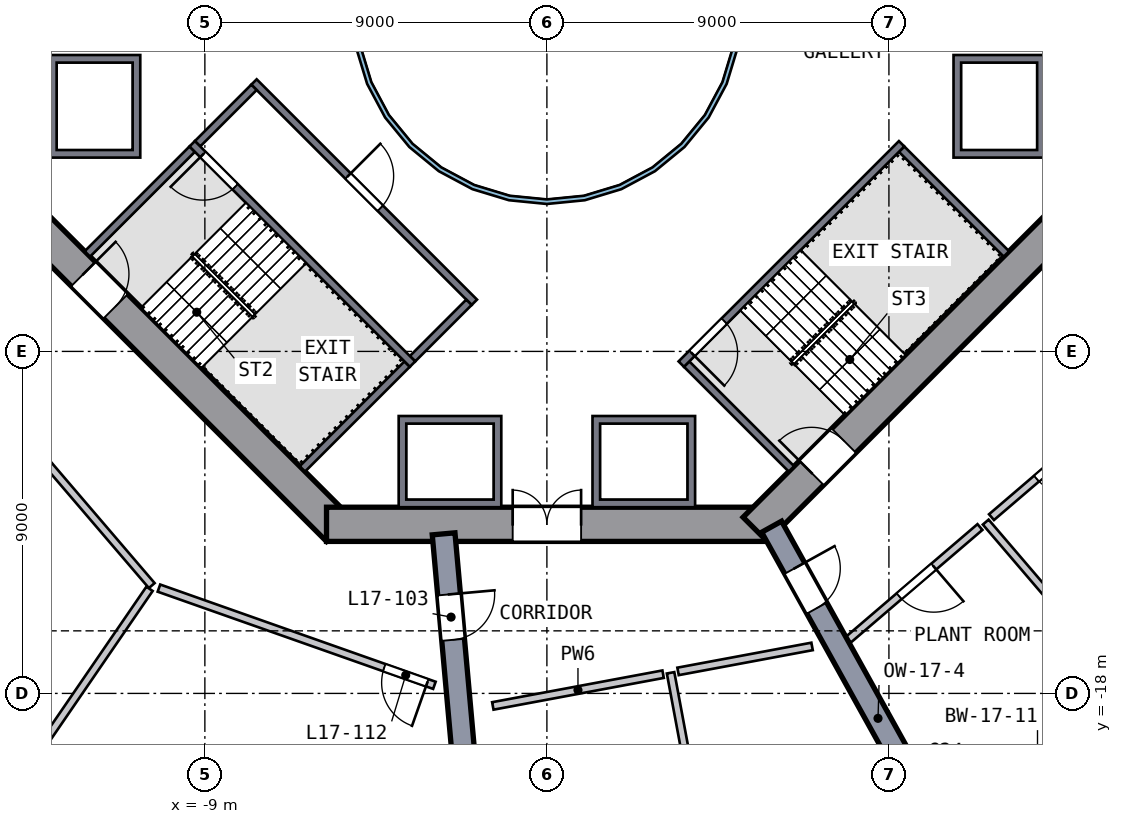
"""IFC4 building model, lengths in metres.
Left out: names, types, materials, properties, quantities, classifications, styles, units other than length and angle.
Written with IfcOpenShell. Run it as: python <this file> out.ifc"""

import sys

from ifc_helpers import new_model, si_unit, direction, frame, frame_2d, origin, place, context, subcontext, project, spatial, polyline, rectangle, outline, extrude, element, fill, save


model = new_model("IFC4")
c1 = context("Model", 3, precision=1e-05, world=origin(), true_north=direction((0.0, 1.0)))
c2 = subcontext(c1, "Body", "Model", "MODEL_VIEW")
j1 = project(units=[si_unit("LENGTHUNIT", "METRE"), si_unit("PLANEANGLEUNIT", "RADIAN")], contexts=[c1])
p1 = place(None, origin())
s1 = spatial("IfcSite", under=j1, at=p1, CompositionType="ELEMENT")
p2 = place(p1, origin())
s2 = spatial("IfcBuilding", under=s1, at=p2, CompositionType="ELEMENT")
p3 = place(p2, frame((0.0, 0.0, 75.0)))
s3 = spatial("IfcBuildingStorey", under=s2, at=p3, CompositionType="ELEMENT", Elevation=75.0)
p4 = place(p3, frame((-13.682, -5.481, 0.0), z_axis=(0.0, 0.0, 1.0), x_axis=(0.707106781, -0.707106781, 0.0)))
e1 = element("IfcWall", 1, at=p4, inside=s3, PredefinedType="SHEAR", context=c2, shape_type="SweptSolid", body=[
    extrude(rectangle(XDim=11.598, YDim=0.9, at=frame_2d((5.799, 0.0))), origin(), (0.0, 0.0, 1.0), 6.0),
])
p5 = place(p4, frame((2.099, 0.0, 0.0)))
e2 = element("IfcOpeningElement", 2, at=p5, cuts=e1, PredefinedType="OPENING", context=c2, shape_type="SweptSolid", body=[
    extrude(rectangle(XDim=1.2, YDim=2.1, at=frame_2d((0.6, 1.05))), frame((0.0, 0.46, 0.0), z_axis=(0.0, -1.0, 0.0), x_axis=(1.0, 0.0, 0.0)), (0.0, 0.0, 1.0), 0.92),
])
p6 = place(p3, frame((-5.799, -13.55, 0.0), z_axis=(0.0, 0.0, 1.0), x_axis=(1.0, 0.0, 0.0)))
e3 = element("IfcWall", 3, at=p6, inside=s3, PredefinedType="SHEAR", context=c2, shape_type="SweptSolid", body=[
    extrude(rectangle(XDim=11.598, YDim=0.9, at=frame_2d((5.799, 0.0))), origin(), (0.0, 0.0, 1.0), 6.0),
])
p7 = place(p6, frame((4.899, 0.0, 0.0)))
e4 = element("IfcOpeningElement", 4, at=p7, cuts=e3, PredefinedType="OPENING", context=c2, shape_type="SweptSolid", body=[
    extrude(rectangle(XDim=1.8, YDim=2.1, at=frame_2d((0.9, 1.05))), frame((0.0, 0.46, 0.0), z_axis=(0.0, -1.0, 0.0), x_axis=(1.0, 0.0, 0.0)), (0.0, 0.0, 1.0), 0.92),
])
p8 = place(p3, frame((5.481, -13.682, 0.0), z_axis=(0.0, 0.0, 1.0), x_axis=(0.707106781, 0.707106781, 0.0)))
e5 = element("IfcWall", 5, at=p8, inside=s3, PredefinedType="SHEAR", context=c2, shape_type="SweptSolid", body=[
    extrude(rectangle(XDim=11.598, YDim=0.9, at=frame_2d((5.799, 0.0))), origin(), (0.0, 0.0, 1.0), 6.0),
])
p9 = place(p8, frame((2.099, 0.0, 0.0)))
e6 = element("IfcOpeningElement", 6, at=p9, cuts=e5, PredefinedType="OPENING", context=c2, shape_type="SweptSolid", body=[
    extrude(rectangle(XDim=1.2, YDim=2.1, at=frame_2d((0.6, 1.05))), frame((0.0, 0.46, 0.0), z_axis=(0.0, -1.0, 0.0), x_axis=(1.0, 0.0, 0.0)), (0.0, 0.0, 1.0), 0.92),
])
p10 = place(p3, frame((11.035, -21.307, 0.0), z_axis=(0.0, 0.0, 1.0), x_axis=(0.788051606, 0.615609183, 0.0)))
e7 = element("IfcWall", 7, at=p10, inside=s3, PredefinedType="SHEAR", context=c2, shape_type="SweptSolid", body=[
    extrude(rectangle(XDim=4.757, YDim=0.4, at=frame_2d((2.378, 0.0))), origin(), (0.0, 0.0, 1.0), 4.5),
])
p11 = place(p3, frame((-2.718, -13.801, 0.0), z_axis=(0.0, 0.0, 1.0), x_axis=(0.089502977, -0.995986555, 0.0)))
e8 = element("IfcWall", 8, at=p11, inside=s3, PredefinedType="SHEAR", context=c2, shape_type="SweptSolid", body=[
    extrude(rectangle(XDim=9.869, YDim=0.6, at=frame_2d((4.935, 0.0))), origin(), (0.0, 0.0, 1.0), 4.5),
])
p12 = place(p11, frame((1.6, 0.0, 0.0)))
e9 = element("IfcOpeningElement", 9, at=p12, cuts=e8, PredefinedType="OPENING", context=c2, shape_type="SweptSolid", body=[
    extrude(rectangle(XDim=1.2, YDim=2.1, at=frame_2d((0.6, 1.05))), frame((0.0, 0.31, 0.0), z_axis=(0.0, -1.0, 0.0), x_axis=(1.0, 0.0, 0.0)), (0.0, 0.0, 1.0), 0.62),
])
p13 = place(p3, frame((5.913, -13.614, 0.0), z_axis=(0.0, 0.0, 1.0), x_axis=(0.485409605, -0.874286861, 0.0)))
e10 = element("IfcWall", 10, at=p13, inside=s3, PredefinedType="SHEAR", context=c2, shape_type="SweptSolid", body=[
    extrude(rectangle(XDim=8.885, YDim=0.6, at=frame_2d((4.442, 0.0))), origin(), (0.0, 0.0, 1.0), 4.5),
])
p14 = place(p13, frame((1.25, 0.0, 0.0)))
e11 = element("IfcOpeningElement", 11, at=p14, cuts=e10, PredefinedType="OPENING", context=c2, shape_type="SweptSolid", body=[
    extrude(rectangle(XDim=1.2, YDim=2.1, at=frame_2d((0.6, 1.05))), frame((0.0, 0.31, 0.0), z_axis=(0.0, -1.0, 0.0), x_axis=(1.0, 0.0, 0.0)), (0.0, 0.0, 1.0), 0.62),
])
p15 = place(p3, frame((10.787, -22.599, 0.0), z_axis=(0.0, 0.0, 1.0), x_axis=(0.759722997, 0.650246851, 0.0)))
e12 = element("IfcWall", 12, at=p15, inside=s3, PredefinedType="SOLIDWALL", context=c2, shape_type="SweptSolid", body=[
    extrude(rectangle(XDim=13.075, YDim=0.15, at=frame_2d((6.538, 0.0))), origin(), (0.0, 0.0, 1.0), 4.5),
])
p16 = place(p3, origin())
e13 = element("IfcWall", 13, at=p16, inside=s3, PredefinedType="SOLIDWALL", context=c2, shape_type="SweptSolid", body=[
    extrude(outline(polyline([(13.1, -1.2), (13.1, -3.9), (10.7, -3.9), (10.7, -1.2), (13.1, -1.2)]), holes=[polyline([(10.9, -3.7), (12.9, -3.7), (12.9, -1.4), (10.9, -1.4), (10.9, -3.7)])]), origin(), (0.0, 0.0, 1.0), 5.55),
])
p17 = place(p3, origin())
e14 = element("IfcWall", 14, at=p17, inside=s3, PredefinedType="SOLIDWALL", context=c2, shape_type="SweptSolid", body=[
    extrude(outline(polyline([(-10.7, -3.9), (-13.1, -3.9), (-13.1, -1.2), (-10.7, -1.2), (-10.7, -3.9)]), holes=[polyline([(-12.9, -1.4), (-12.9, -3.7), (-10.9, -3.7), (-10.9, -1.4), (-12.9, -1.4)])]), origin(), (0.0, 0.0, 1.0), 5.55),
])
p18 = place(p3, origin())
e15 = element("IfcWall", 15, at=p18, inside=s3, PredefinedType="SOLIDWALL", context=c2, shape_type="SweptSolid", body=[
    extrude(outline(polyline([(-1.2, -13.1), (-3.9, -13.1), (-3.9, -10.7), (-1.2, -10.7), (-1.2, -13.1)]), holes=[polyline([(-3.7, -10.9), (-3.7, -12.9), (-1.4, -12.9), (-1.4, -10.9), (-3.7, -10.9)])]), origin(), (0.0, 0.0, 1.0), 5.55),
])
p19 = place(p3, origin())
e16 = element("IfcWall", 16, at=p19, inside=s3, PredefinedType="SOLIDWALL", context=c2, shape_type="SweptSolid", body=[
    extrude(outline(polyline([(3.9, -10.7), (3.9, -13.1), (1.2, -13.1), (1.2, -10.7), (3.9, -10.7)]), holes=[polyline([(1.4, -12.9), (3.7, -12.9), (3.7, -10.9), (1.4, -10.9), (1.4, -12.9)])]), origin(), (0.0, 0.0, 1.0), 5.55),
])
p20 = place(p3, frame((-3.535, -9.334, 0.0), z_axis=(0.0, 0.0, 1.0), x_axis=(-0.707106781, 0.707106781, 0.0)))
e17 = element("IfcWall", 17, at=p20, inside=s3, PredefinedType="SOLIDWALL", context=c2, shape_type="SweptSolid", body=[
    extrude(rectangle(XDim=8.2, YDim=0.2, at=frame_2d((4.1, 0.0))), origin(), (0.0, 0.0, 1.0), 5.55),
])
p21 = place(p20, frame((6.6, 0.0, 0.0)))
e18 = element("IfcOpeningElement", 18, at=p21, cuts=e17, PredefinedType="OPENING", context=c2, shape_type="SweptSolid", body=[
    extrude(rectangle(XDim=1.2, YDim=2.1, at=frame_2d((0.6, 1.05))), frame((0.0, 0.11, 0.0), z_axis=(0.0, -1.0, 0.0), x_axis=(1.0, 0.0, 0.0)), (0.0, 0.0, 1.0), 0.22),
])
for number, where, z_axis, x_axis in (
    (19, (-9.334, -3.677, 0.0), (0.0, 0.0, 1.0), (-0.707, -0.707, 0.0)),
    (20, (-3.677, -9.334, 0.0), (0.0, 0.0, 1.0), (-0.707, -0.707, 0.0)),
):
    element("IfcWall", number, at=place(p3, frame(where, z_axis=z_axis, x_axis=x_axis)), inside=s3, PredefinedType="SOLIDWALL", context=c2, shape_type="SweptSolid", body=[
        extrude(rectangle(XDim=3.9, YDim=0.2, at=frame_2d((1.95, 0.0))), origin(), (0.0, 0.0, 1.0), 5.55),
    ])
p22 = place(p3, frame((9.334, -3.535, 0.0), z_axis=(0.0, 0.0, 1.0), x_axis=(-0.707106781, -0.707106781, 0.0)))
e21 = element("IfcWall", 21, at=p22, inside=s3, PredefinedType="SOLIDWALL", context=c2, shape_type="SweptSolid", body=[
    extrude(rectangle(XDim=8.2, YDim=0.2, at=frame_2d((4.1, 0.0))), origin(), (0.0, 0.0, 1.0), 5.55),
])
p23 = place(p22, frame((6.6, 0.0, 0.0)))
e22 = element("IfcOpeningElement", 22, at=p23, cuts=e21, PredefinedType="OPENING", context=c2, shape_type="SweptSolid", body=[
    extrude(rectangle(XDim=1.2, YDim=2.1, at=frame_2d((0.6, 1.05))), frame((0.0, 0.11, 0.0), z_axis=(0.0, -1.0, 0.0), x_axis=(1.0, 0.0, 0.0)), (0.0, 0.0, 1.0), 0.22),
])
for number, where, z_axis, x_axis in (
    (23, (3.677, -9.334, 0.0), (0.0, 0.0, 1.0), (0.707, -0.707, 0.0)),
    (24, (9.334, -3.677, 0.0), (0.0, 0.0, 1.0), (0.707, -0.707, 0.0)),
):
    element("IfcWall", number, at=place(p3, frame(where, z_axis=z_axis, x_axis=x_axis)), inside=s3, PredefinedType="SOLIDWALL", context=c2, shape_type="SweptSolid", body=[
        extrude(rectangle(XDim=3.9, YDim=0.2, at=frame_2d((1.95, 0.0))), origin(), (0.0, 0.0, 1.0), 5.55),
    ])
p24 = place(p3, frame((-7.708, -1.909, 0.0), z_axis=(0.0, 0.0, 1.0), x_axis=(0.707106781, -0.707106781, 0.0)))
e25 = element("IfcWall", 25, at=p24, inside=s3, PredefinedType="SOLIDWALL", context=c2, shape_type="SweptSolid", body=[
    extrude(rectangle(XDim=8.2, YDim=0.2, at=frame_2d((4.1, 0.0))), origin(), (0.0, 0.0, 1.0), 5.55),
])
p25 = place(p24, frame((3.5, 0.0, 0.0)))
e26 = element("IfcOpeningElement", 26, at=p25, cuts=e25, PredefinedType="OPENING", context=c2, shape_type="SweptSolid", body=[
    extrude(rectangle(XDim=1.2, YDim=2.1, at=frame_2d((0.6, 1.05))), frame((0.0, 0.11, 0.0), z_axis=(0.0, -1.0, 0.0), x_axis=(1.0, 0.0, 0.0)), (0.0, 0.0, 1.0), 0.22),
])
for number, where, z_axis, x_axis in (
    (27, (-7.708, -2.051, 0.0), (0.0, 0.0, 1.0), (-0.707, -0.707, 0.0)),
    (28, (-2.051, -7.708, 0.0), (0.0, 0.0, 1.0), (-0.707, -0.707, 0.0)),
):
    element("IfcWall", number, at=place(p3, frame(where, z_axis=z_axis, x_axis=x_axis)), inside=s3, PredefinedType="SOLIDWALL", context=c2, shape_type="SweptSolid", body=[
        extrude(rectangle(XDim=2.1, YDim=0.2, at=frame_2d((1.05, 0.0))), origin(), (0.0, 0.0, 1.0), 5.55),
    ])
p26 = place(p3, origin())
e29 = element("IfcWall", 29, at=p26, inside=s3, PredefinedType="SOLIDWALL", context=c2, shape_type="SweptSolid", body=[
    extrude(outline(polyline([(5.021, -0.999), (4.73, -1.959), (4.257, -2.844), (3.62, -3.62), (2.844, -4.257), (1.959, -4.73), (0.999, -5.021), (0.0, -5.12), (-0.999, -5.021), (-1.959, -4.73), (-2.844, -4.257), (-3.62, -3.62), (-4.257, -2.844), (-4.73, -1.959), (-5.021, -0.999), (-5.12, 0.0), (-5.021, 0.999), (-4.73, 1.959), (-4.257, 2.844), (-3.62, 3.62), (-2.844, 4.257), (-1.959, 4.73), (-0.999, 5.021), (0.0, 5.12), (0.999, 5.021), (1.959, 4.73), (2.844, 4.257), (3.62, 3.62), (4.257, 2.844), (4.73, 1.959), (5.021, 0.999), (5.12, 0.0), (5.021, -0.999)]), holes=[polyline([(4.904, 0.976), (4.619, 1.913), (4.157, 2.778), (3.535, 3.535), (2.778, 4.157), (1.913, 4.619), (0.976, 4.904), (0.0, 5.0), (-0.976, 4.904), (-1.913, 4.619), (-2.778, 4.157), (-3.535, 3.535), (-4.157, 2.778), (-4.619, 1.913), (-4.904, 0.976), (-5.0, 0.0), (-4.904, -0.976), (-4.619, -1.913), (-4.157, -2.778), (-3.535, -3.535), (-2.778, -4.157), (-1.913, -4.619), (-0.976, -4.904), (0.0, -5.0), (0.976, -4.904), (1.913, -4.619), (2.778, -4.157), (3.535, -3.535), (4.157, -2.778), (4.619, -1.913), (4.904, -0.976), (5.0, 0.0), (4.904, 0.976)])]), origin(), (0.0, 0.0, 1.0), 5.55),
])
p27 = place(p3, frame((-10.397, -15.162, 0.0), z_axis=(0.0, 0.0, 1.0), x_axis=(-0.650250342, 0.75972001, 0.0)))
e30 = element("IfcWall", 30, at=p27, inside=s3, PredefinedType="SOLIDWALL", context=c2, shape_type="SweptSolid", body=[
    extrude(rectangle(XDim=9.516, YDim=0.2, at=frame_2d((4.758, 0.0))), origin(), (0.0, 0.0, 1.0), 4.5),
])
p28 = place(p27, frame((4.15, 0.0, 0.0)))
e31 = element("IfcOpeningElement", 31, at=p28, cuts=e30, PredefinedType="OPENING", context=c2, shape_type="SweptSolid", body=[
    extrude(rectangle(XDim=1.2, YDim=2.1, at=frame_2d((0.6, 1.05))), frame((0.0, 0.11, 0.0), z_axis=(0.0, -1.0, 0.0), x_axis=(1.0, 0.0, 0.0)), (0.0, 0.0, 1.0), 0.22),
])
p29 = place(p3, frame((-10.456, -15.248, 0.0), z_axis=(0.0, 0.0, 1.0), x_axis=(-0.565562702, -0.824705299, 0.0)))
e32 = element("IfcWall", 32, at=p29, inside=s3, PredefinedType="SOLIDWALL", context=c2, shape_type="SweptSolid", body=[
    extrude(rectangle(XDim=5.525, YDim=0.2, at=frame_2d((2.763, 0.0))), origin(), (0.0, 0.0, 1.0), 4.5),
])
p30 = place(p3, frame((-2.96, -17.787, 0.0), z_axis=(0.0, 0.0, 1.0), x_axis=(-0.942995025, 0.332806826, 0.0)))
e33 = element("IfcWall", 33, at=p30, inside=s3, PredefinedType="SOLIDWALL", context=c2, shape_type="SweptSolid", body=[
    extrude(rectangle(XDim=7.687, YDim=0.2, at=frame_2d((3.843, 0.0))), origin(), (0.0, 0.0, 1.0), 4.5),
])
p31 = place(p30, frame((0.2, 0.0, 0.0)))
e34 = element("IfcOpeningElement", 34, at=p31, cuts=e33, PredefinedType="OPENING", context=c2, shape_type="SweptSolid", body=[
    extrude(rectangle(XDim=1.2, YDim=2.1, at=frame_2d((0.6, 1.05))), frame((0.0, 0.11, 0.0), z_axis=(0.0, -1.0, 0.0), x_axis=(1.0, 0.0, 0.0)), (0.0, 0.0, 1.0), 0.22),
])
p32 = place(p3, frame((-1.423, -18.33, 0.0), z_axis=(0.0, 0.0, 1.0), x_axis=(0.983056045, 0.183305241, 0.0)))
e35 = element("IfcWall", 35, at=p32, inside=s3, PredefinedType="SOLIDWALL", context=c2, shape_type="SweptSolid", body=[
    extrude(rectangle(XDim=4.558, YDim=0.2, at=frame_2d((2.279, 0.0))), origin(), (0.0, 0.0, 1.0), 4.5),
])
p33 = place(p3, frame((3.254, -17.458, 0.0), z_axis=(0.0, 0.0, 1.0), x_axis=(0.18327865, -0.983061003, 0.0)))
e36 = element("IfcWall", 36, at=p33, inside=s3, PredefinedType="SOLIDWALL", context=c2, shape_type="SweptSolid", body=[
    extrude(rectangle(XDim=6.35, YDim=0.2, at=frame_2d((3.175, 0.0))), origin(), (0.0, 0.0, 1.0), 4.5),
])
p34 = place(p3, frame((3.451, -17.421, 0.0), z_axis=(0.0, 0.0, 1.0), x_axis=(0.983061962, 0.183273511, 0.0)))
e37 = element("IfcWall", 37, at=p34, inside=s3, PredefinedType="SOLIDWALL", context=c2, shape_type="SweptSolid", body=[
    extrude(rectangle(XDim=3.587, YDim=0.2, at=frame_2d((1.794, 0.0))), origin(), (0.0, 0.0, 1.0), 4.5),
])
p35 = place(p3, frame((11.395, -13.622, 0.0), z_axis=(0.0, 0.0, 1.0), x_axis=(-0.759729045, -0.650239785, 0.0)))
e38 = element("IfcWall", 38, at=p35, inside=s3, PredefinedType="SOLIDWALL", context=c2, shape_type="SweptSolid", body=[
    extrude(rectangle(XDim=4.558, YDim=0.2, at=frame_2d((2.279, 0.0))), origin(), (0.0, 0.0, 1.0), 4.5),
])
p36 = place(p35, frame((1.6, 0.0, 0.0)))
e39 = element("IfcOpeningElement", 39, at=p36, cuts=e38, PredefinedType="OPENING", context=c2, shape_type="SweptSolid", body=[
    extrude(rectangle(XDim=1.2, YDim=2.1, at=frame_2d((0.6, 1.05))), frame((0.0, 0.11, 0.0), z_axis=(0.0, -1.0, 0.0), x_axis=(1.0, 0.0, 0.0)), (0.0, 0.0, 1.0), 0.22),
])
p37 = place(p3, frame((15.01, -10.528, 0.0), z_axis=(0.0, 0.0, 1.0), x_axis=(-0.759742775, -0.650223742, 0.0)))
e40 = element("IfcWall", 40, at=p37, inside=s3, PredefinedType="SOLIDWALL", context=c2, shape_type="SweptSolid", body=[
    extrude(rectangle(XDim=4.358, YDim=0.2, at=frame_2d((2.179, 0.0))), origin(), (0.0, 0.0, 1.0), 4.5),
])
p38 = place(p37, frame((1.6, 0.0, 0.0)))
e41 = element("IfcOpeningElement", 41, at=p38, cuts=e40, PredefinedType="OPENING", context=c2, shape_type="SweptSolid", body=[
    extrude(rectangle(XDim=1.2, YDim=2.1, at=frame_2d((0.6, 1.05))), frame((0.0, 0.11, 0.0), z_axis=(0.0, -1.0, 0.0), x_axis=(1.0, 0.0, 0.0)), (0.0, 0.0, 1.0), 0.22),
])
p39 = place(p3, frame((11.547, -13.491, 0.0), z_axis=(0.0, 0.0, 1.0), x_axis=(0.650233927, -0.759734059, 0.0)))
e42 = element("IfcWall", 42, at=p39, inside=s3, PredefinedType="SOLIDWALL", context=c2, shape_type="SweptSolid", body=[
    extrude(rectangle(XDim=6.35, YDim=0.2, at=frame_2d((3.175, 0.0))), origin(), (0.0, 0.0, 1.0), 4.5),
])
p40 = place(p21, origin())
e43 = element("IfcDoor", 43, at=p40, inside=s3, OperationType="SINGLE_SWING_RIGHT", PredefinedType="DOOR", context=c2, shape_type="SweptSolid", body=[
    extrude(rectangle(XDim=1.2, YDim=2.1, at=frame_2d((0.6, 1.05))), frame((0.0, 0.025, 0.0), z_axis=(0.0, -1.0, 0.0), x_axis=(1.0, 0.0, 0.0)), (0.0, 0.0, 1.0), 0.05),
])
fill(e18, e43)
p41 = place(p23, origin())
e44 = element("IfcDoor", 44, at=p41, inside=s3, OperationType="SINGLE_SWING_RIGHT", PredefinedType="DOOR", context=c2, shape_type="SweptSolid", body=[
    extrude(rectangle(XDim=1.2, YDim=2.1, at=frame_2d((0.6, 1.05))), frame((0.0, 0.025, 0.0), z_axis=(0.0, -1.0, 0.0), x_axis=(1.0, 0.0, 0.0)), (0.0, 0.0, 1.0), 0.05),
])
fill(e22, e44)
p42 = place(p7, origin())
e45 = element("IfcDoor", 45, at=p42, inside=s3, OperationType="DOUBLE_DOOR_SINGLE_SWING", PredefinedType="DOOR", context=c2, shape_type="SweptSolid", body=[
    extrude(rectangle(XDim=1.8, YDim=2.1, at=frame_2d((0.9, 1.05))), frame((0.0, 0.025, 0.0), z_axis=(0.0, -1.0, 0.0), x_axis=(1.0, 0.0, 0.0)), (0.0, 0.0, 1.0), 0.05),
])
fill(e4, e45)
p43 = place(p5, origin())
e46 = element("IfcDoor", 46, at=p43, inside=s3, OperationType="SINGLE_SWING_LEFT", PredefinedType="DOOR", context=c2, shape_type="SweptSolid", body=[
    extrude(rectangle(XDim=1.2, YDim=2.1, at=frame_2d((0.6, 1.05))), frame((0.0, 0.025, 0.0), z_axis=(0.0, -1.0, 0.0), x_axis=(1.0, 0.0, 0.0)), (0.0, 0.0, 1.0), 0.05),
])
fill(e2, e46)
p44 = place(p9, origin())
e47 = element("IfcDoor", 47, at=p44, inside=s3, OperationType="SINGLE_SWING_LEFT", PredefinedType="DOOR", context=c2, shape_type="SweptSolid", body=[
    extrude(rectangle(XDim=1.2, YDim=2.1, at=frame_2d((0.6, 1.05))), frame((0.0, 0.025, 0.0), z_axis=(0.0, -1.0, 0.0), x_axis=(1.0, 0.0, 0.0)), (0.0, 0.0, 1.0), 0.05),
])
fill(e6, e47)
p45 = place(p25, origin())
e48 = element("IfcDoor", 48, at=p45, inside=s3, OperationType="SINGLE_SWING_LEFT", PredefinedType="DOOR", context=c2, shape_type="SweptSolid", body=[
    extrude(rectangle(XDim=1.2, YDim=2.1, at=frame_2d((0.6, 1.05))), frame((0.0, 0.025, 0.0), z_axis=(0.0, -1.0, 0.0), x_axis=(1.0, 0.0, 0.0)), (0.0, 0.0, 1.0), 0.05),
])
fill(e26, e48)
p46 = place(p12, origin())
e49 = element("IfcDoor", 49, at=p46, inside=s3, OperationType="SINGLE_SWING_LEFT", PredefinedType="DOOR", context=c2, shape_type="SweptSolid", body=[
    extrude(rectangle(XDim=1.2, YDim=2.1, at=frame_2d((0.6, 1.05))), frame((0.0, 0.025, 0.0), z_axis=(0.0, -1.0, 0.0), x_axis=(1.0, 0.0, 0.0)), (0.0, 0.0, 1.0), 0.05),
])
fill(e9, e49)
p47 = place(p14, origin())
e50 = element("IfcDoor", 50, at=p47, inside=s3, OperationType="SINGLE_SWING_LEFT", PredefinedType="DOOR", context=c2, shape_type="SweptSolid", body=[
    extrude(rectangle(XDim=1.2, YDim=2.1, at=frame_2d((0.6, 1.05))), frame((0.0, 0.025, 0.0), z_axis=(0.0, -1.0, 0.0), x_axis=(1.0, 0.0, 0.0)), (0.0, 0.0, 1.0), 0.05),
])
fill(e11, e50)
p48 = place(p31, origin())
e51 = element("IfcDoor", 51, at=p48, inside=s3, OperationType="SINGLE_SWING_LEFT", PredefinedType="DOOR", context=c2, shape_type="SweptSolid", body=[
    extrude(rectangle(XDim=1.2, YDim=2.1, at=frame_2d((0.6, 1.05))), frame((0.0, 0.025, 0.0), z_axis=(0.0, -1.0, 0.0), x_axis=(1.0, 0.0, 0.0)), (0.0, 0.0, 1.0), 0.05),
])
fill(e34, e51)
p49 = place(p36, origin())
e52 = element("IfcDoor", 52, at=p49, inside=s3, OperationType="SINGLE_SWING_LEFT", PredefinedType="DOOR", context=c2, shape_type="SweptSolid", body=[
    extrude(rectangle(XDim=1.2, YDim=2.1, at=frame_2d((0.6, 1.05))), frame((0.0, 0.025, 0.0), z_axis=(0.0, -1.0, 0.0), x_axis=(1.0, 0.0, 0.0)), (0.0, 0.0, 1.0), 0.05),
])
fill(e39, e52)
p50 = place(p38, origin())
e53 = element("IfcDoor", 53, at=p50, inside=s3, OperationType="SINGLE_SWING_LEFT", PredefinedType="DOOR", context=c2, shape_type="SweptSolid", body=[
    extrude(rectangle(XDim=1.2, YDim=2.1, at=frame_2d((0.6, 1.05))), frame((0.0, 0.025, 0.0), z_axis=(0.0, -1.0, 0.0), x_axis=(1.0, 0.0, 0.0)), (0.0, 0.0, 1.0), 0.05),
])
fill(e41, e53)
save(model, sys.argv[1])
